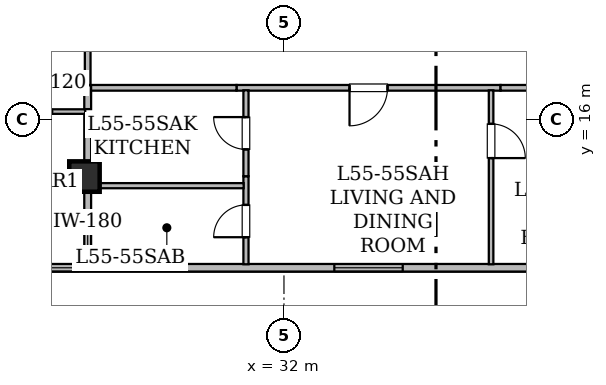
"""IFC4 building model, lengths in metres.
Left out: names, types, materials, properties, quantities, classifications, styles, units other than length and angle.
Written with IfcOpenShell. Run it as: python <this file> out.ifc"""

import sys

from ifc_helpers import new_model, si_unit, direction, frame, frame_2d, origin, origin_2d, place, context, subcontext, project, spatial, rectangle, hollow_rectangle, extrude, element, fill, save


model = new_model("IFC4")
c1 = context("Model", 3, precision=1e-05, world=origin(), true_north=direction((0.0, 1.0)))
c2 = subcontext(c1, "Body", "Model", "MODEL_VIEW")
j1 = project(units=[si_unit("LENGTHUNIT", "METRE"), si_unit("PLANEANGLEUNIT", "RADIAN")], contexts=[c1])
p1 = place(None, origin())
s1 = spatial("IfcSite", under=j1, at=p1, CompositionType="ELEMENT")
p2 = place(p1, origin())
s2 = spatial("IfcBuilding", under=s1, at=p2, CompositionType="ELEMENT")
p3 = place(p2, frame((0.0, 0.0, 217.2)))
s3 = spatial("IfcBuildingStorey", under=s2, at=p3, CompositionType="ELEMENT", Elevation=217.2)
p4 = place(p3, frame((26.75, 14.5, 0.025), z_axis=(0.0, 0.0, 1.0), x_axis=(1.0, 0.0, 0.0)))
e1 = element("IfcColumn", 1, at=p4, inside=s3, PredefinedType="COLUMN", context=c2, shape_type="SweptSolid", body=[
    extrude(hollow_rectangle(XDim=0.8, YDim=0.8, WallThickness=0.04, at=origin_2d()), origin(), (0.0, 0.0, 1.0), 3.625),
])
p5 = place(p3, frame((65.696, 12.1, 0.0), z_axis=(0.0, 0.0, 1.0), x_axis=(-1.0, 0.0, 0.0)))
e2 = element("IfcWall", 2, at=p5, inside=s3, PredefinedType="STANDARD", context=c2, shape_type="SweptSolid", body=[
    extrude(rectangle(XDim=41.393, YDim=0.2, at=frame_2d((20.697, 0.0))), origin(), (0.0, 0.0, 1.0), 3.43),
])
p6 = place(p5, frame((39.085, 0.0, 0.85)))
e3 = element("IfcOpeningElement", 3, at=p6, cuts=e2, PredefinedType="OPENING", context=c2, shape_type="SweptSolid", body=[
    extrude(rectangle(XDim=1.8, YDim=0.92, at=frame_2d((0.9, 0.46))), frame((0.0, 0.11, 0.0), z_axis=(0.0, -1.0, 0.0), x_axis=(1.0, 0.0, 0.0)), (0.0, 0.0, 1.0), 0.22),
])
p7 = place(p5, frame((30.571, 0.0, 0.85)))
e4 = element("IfcOpeningElement", 4, at=p7, cuts=e2, PredefinedType="OPENING", context=c2, shape_type="SweptSolid", body=[
    extrude(rectangle(XDim=1.8, YDim=0.92, at=frame_2d((0.9, 0.46))), frame((0.0, 0.11, 0.0), z_axis=(0.0, -1.0, 0.0), x_axis=(1.0, 0.0, 0.0)), (0.0, 0.0, 1.0), 0.22),
])
p8 = place(p5, frame((25.264, 0.0, 0.85)))
e5 = element("IfcOpeningElement", 5, at=p8, cuts=e2, PredefinedType="OPENING", context=c2, shape_type="SweptSolid", body=[
    extrude(rectangle(XDim=1.8, YDim=0.92, at=frame_2d((0.9, 0.46))), frame((0.0, 0.11, 0.0), z_axis=(0.0, -1.0, 0.0), x_axis=(1.0, 0.0, 0.0)), (0.0, 0.0, 1.0), 0.22),
])
p9 = place(p5, frame((16.538, 0.0, 0.85)))
e6 = element("IfcOpeningElement", 6, at=p9, cuts=e2, PredefinedType="OPENING", context=c2, shape_type="SweptSolid", body=[
    extrude(rectangle(XDim=1.8, YDim=0.92, at=frame_2d((0.9, 0.46))), frame((0.0, 0.11, 0.0), z_axis=(0.0, -1.0, 0.0), x_axis=(1.0, 0.0, 0.0)), (0.0, 0.0, 1.0), 0.22),
])
p10 = place(p5, frame((4.105, 0.0, 0.85)))
e7 = element("IfcOpeningElement", 7, at=p10, cuts=e2, PredefinedType="OPENING", context=c2, shape_type="SweptSolid", body=[
    extrude(rectangle(XDim=1.8, YDim=0.92, at=frame_2d((0.9, 0.46))), frame((0.0, 0.11, 0.0), z_axis=(0.0, -1.0, 0.0), x_axis=(1.0, 0.0, 0.0)), (0.0, 0.0, 1.0), 0.22),
])
p11 = place(p3, frame((26.835, 16.9, 0.0), z_axis=(0.0, 0.0, 1.0), x_axis=(0.0, 1.0, 0.0)))
e8 = element("IfcWall", 8, at=p11, inside=s3, PredefinedType="STANDARD", context=c2, shape_type="SweptSolid", body=[
    extrude(rectangle(XDim=7.708, YDim=0.15, at=frame_2d((3.854, 0.0))), origin(), (0.0, 0.0, 1.0), 2.725),
])
p12 = place(p11, frame((3.333, 0.0, 0.0)))
e9 = element("IfcOpeningElement", 9, at=p12, cuts=e8, PredefinedType="OPENING", context=c2, shape_type="SweptSolid", body=[
    extrude(rectangle(XDim=1.0, YDim=2.15, at=frame_2d((0.5, 1.075))), frame((0.0, 0.085, 0.0), z_axis=(0.0, -1.0, 0.0), x_axis=(1.0, 0.0, 0.0)), (0.0, 0.0, 1.0), 0.17),
])
p13 = place(p3, frame((37.699, 16.835, 0.0), z_axis=(0.0, 0.0, 1.0), x_axis=(-1.0, 0.0, 0.0)))
e10 = element("IfcWall", 10, at=p13, inside=s3, PredefinedType="STANDARD", context=c2, shape_type="SweptSolid", body=[
    extrude(rectangle(XDim=6.948, YDim=0.15, at=frame_2d((3.474, 0.0))), origin(), (0.0, 0.0, 1.0), 3.43),
])
p14 = place(p13, frame((2.974, 0.0, 0.0)))
e11 = element("IfcOpeningElement", 11, at=p14, cuts=e10, PredefinedType="OPENING", context=c2, shape_type="SweptSolid", body=[
    extrude(rectangle(XDim=1.0, YDim=2.15, at=frame_2d((0.5, 1.075))), frame((0.0, 0.085, 0.0), z_axis=(0.0, -1.0, 0.0), x_axis=(1.0, 0.0, 0.0)), (0.0, 0.0, 1.0), 0.17),
])
for number, where, z_axis, x_axis in (
    (12, (30.751, 16.835, 0.0), (0.0, 0.0, 1.0), (-1.0, 0.0, 0.0)),
    (13, (41.55, 16.835, 0.0), (0.0, 0.0, 1.0), (-1.0, 0.0, 0.0)),
):
    element("IfcWall", number, at=place(p3, frame(where, z_axis=z_axis, x_axis=x_axis)), inside=s3, PredefinedType="STANDARD", context=c2, shape_type="SweptSolid", body=[
        extrude(rectangle(XDim=3.851, YDim=0.15, at=frame_2d((1.926, 0.0))), origin(), (0.0, 0.0, 1.0), 2.725),
    ])
p15 = place(p3, frame((26.77, 16.21, 0.0), z_axis=(0.0, 0.0, 1.0), x_axis=(-1.0, 0.0, 0.0)))
e14 = element("IfcWall", 14, at=p15, inside=s3, PredefinedType="PARTITIONING", context=c2, shape_type="SweptSolid", body=[
    extrude(rectangle(XDim=6.378, YDim=0.12, at=frame_2d((3.189, 0.0))), origin(), (0.0, 0.0, 1.0), 2.887),
])
p16 = place(p15, frame((2.739, 0.0, 0.0)))
e15 = element("IfcOpeningElement", 15, at=p16, cuts=e14, PredefinedType="OPENING", context=c2, shape_type="SweptSolid", body=[
    extrude(rectangle(XDim=0.9, YDim=2.1, at=frame_2d((0.45, 1.05))), frame((0.0, 0.07, 0.0), z_axis=(0.0, -1.0, 0.0), x_axis=(1.0, 0.0, 0.0)), (0.0, 0.0, 1.0), 0.14),
])
p17 = place(p3, frame((26.835, 16.9, 0.0), z_axis=(0.0, 0.0, 1.0), x_axis=(0.0, -1.0, 0.0)))
e16 = element("IfcWall", 16, at=p17, inside=s3, PredefinedType="STANDARD", context=c2, shape_type="SweptSolid", body=[
    extrude(rectangle(XDim=0.625, YDim=0.18, at=frame_2d((0.312, 0.0))), origin(), (0.0, 0.0, 1.0), 3.43),
])
p18 = place(p3, frame((26.835, 14.509, 0.0), z_axis=(0.0, 0.0, 1.0), x_axis=(0.0, -1.0, 0.0)))
e17 = element("IfcWall", 17, at=p18, inside=s3, PredefinedType="STANDARD", context=c2, shape_type="SweptSolid", body=[
    extrude(rectangle(XDim=2.317, YDim=0.18, at=frame_2d((1.159, 0.0))), origin(), (0.0, 0.0, 1.0), 2.725),
])
p19 = place(p3, frame((26.835, 16.145, 0.0), z_axis=(0.0, 0.0, 1.0), x_axis=(0.0, -1.0, 0.0)))
e18 = element("IfcWall", 18, at=p19, inside=s3, PredefinedType="STANDARD", context=c2, shape_type="SweptSolid", body=[
    extrude(rectangle(XDim=1.636, YDim=0.18, at=frame_2d((0.818, 0.0))), origin(), (0.0, 0.0, 1.0), 2.725),
])
p20 = place(p3, frame((31.0, 12.192, 0.0), z_axis=(0.0, 0.0, 1.0), x_axis=(0.0, 1.0, 0.0)))
e19 = element("IfcWall", 19, at=p20, inside=s3, PredefinedType="PARTITIONING", context=c2, shape_type="SweptSolid", body=[
    extrude(rectangle(XDim=2.317, YDim=0.135, at=frame_2d((1.159, 0.0))), origin(), (0.0, 0.0, 1.0), 2.887),
])
p21 = place(p20, frame((0.712, 0.0, 0.0)))
e20 = element("IfcOpeningElement", 20, at=p21, cuts=e19, PredefinedType="OPENING", context=c2, shape_type="SweptSolid", body=[
    extrude(rectangle(XDim=0.85, YDim=2.1, at=frame_2d((0.425, 1.05))), frame((0.0, 0.077, 0.0), z_axis=(0.0, -1.0, 0.0), x_axis=(1.0, 0.0, 0.0)), (0.0, 0.0, 1.0), 0.155),
])
p22 = place(p3, frame((31.0, 14.509, 0.0), z_axis=(0.0, 0.0, 1.0), x_axis=(0.0, 1.0, 0.0)))
e21 = element("IfcWall", 21, at=p22, inside=s3, PredefinedType="PARTITIONING", context=c2, shape_type="SweptSolid", body=[
    extrude(rectangle(XDim=2.261, YDim=0.135, at=frame_2d((1.13, 0.0))), origin(), (0.0, 0.0, 1.0), 2.887),
])
p23 = place(p22, frame((0.706, 0.0, 0.0)))
e22 = element("IfcOpeningElement", 22, at=p23, cuts=e21, PredefinedType="OPENING", context=c2, shape_type="SweptSolid", body=[
    extrude(rectangle(XDim=0.85, YDim=2.1, at=frame_2d((0.425, 1.05))), frame((0.0, 0.077, 0.0), z_axis=(0.0, -1.0, 0.0), x_axis=(1.0, 0.0, 0.0)), (0.0, 0.0, 1.0), 0.155),
])
p24 = place(p3, frame((37.45, 16.77, 0.0), z_axis=(0.0, 0.0, 1.0), x_axis=(0.0, -1.0, 0.0)))
e23 = element("IfcWall", 23, at=p24, inside=s3, PredefinedType="PARTITIONING", context=c2, shape_type="SweptSolid", body=[
    extrude(rectangle(XDim=4.578, YDim=0.12, at=frame_2d((2.289, 0.0))), origin(), (0.0, 0.0, 1.0), 2.887),
])
p25 = place(p24, frame((0.884, 0.0, 0.0)))
e24 = element("IfcOpeningElement", 24, at=p25, cuts=e23, PredefinedType="OPENING", context=c2, shape_type="SweptSolid", body=[
    extrude(rectangle(XDim=0.9, YDim=2.1, at=frame_2d((0.45, 1.05))), frame((0.0, 0.07, 0.0), z_axis=(0.0, -1.0, 0.0), x_axis=(1.0, 0.0, 0.0)), (0.0, 0.0, 1.0), 0.14),
])
p26 = place(p3, frame((26.917, 14.26, 0.0), z_axis=(0.0, 0.0, 1.0), x_axis=(1.0, 0.0, 0.0)))
e25 = element("IfcWall", 25, at=p26, inside=s3, PredefinedType="PARTITIONING", context=c2, shape_type="SweptSolid", body=[
    extrude(rectangle(XDim=4.022, YDim=0.135, at=frame_2d((2.011, 0.0))), origin(), (0.0, 0.0, 1.0), 2.887),
])
p27 = place(p6, origin())
e26 = element("IfcWindow", 26, at=p27, inside=s3, PartitioningType="SINGLE_PANEL", PredefinedType="WINDOW", context=c2, shape_type="SweptSolid", body=[
    extrude(rectangle(XDim=1.8, YDim=0.92, at=frame_2d((0.9, 0.46))), frame((0.0, 0.03, 0.0), z_axis=(0.0, -1.0, 0.0), x_axis=(1.0, 0.0, 0.0)), (0.0, 0.0, 1.0), 0.06),
])
fill(e3, e26)
p28 = place(p7, origin())
e27 = element("IfcWindow", 27, at=p28, inside=s3, PartitioningType="SINGLE_PANEL", PredefinedType="WINDOW", context=c2, shape_type="SweptSolid", body=[
    extrude(rectangle(XDim=1.8, YDim=0.92, at=frame_2d((0.9, 0.46))), frame((0.0, 0.03, 0.0), z_axis=(0.0, -1.0, 0.0), x_axis=(1.0, 0.0, 0.0)), (0.0, 0.0, 1.0), 0.06),
])
fill(e4, e27)
p29 = place(p14, origin())
e28 = element("IfcDoor", 28, at=p29, inside=s3, OperationType="SINGLE_SWING_RIGHT", PredefinedType="DOOR", context=c2, shape_type="SweptSolid", body=[
    extrude(rectangle(XDim=1.0, YDim=2.15, at=frame_2d((0.5, 1.075))), frame((0.0, 0.025, 0.0), z_axis=(0.0, -1.0, 0.0), x_axis=(1.0, 0.0, 0.0)), (0.0, 0.0, 1.0), 0.05),
])
fill(e11, e28)
p30 = place(p21, origin())
e29 = element("IfcDoor", 29, at=p30, inside=s3, OperationType="SINGLE_SWING_LEFT", PredefinedType="DOOR", context=c2, shape_type="SweptSolid", body=[
    extrude(rectangle(XDim=0.85, YDim=2.1, at=frame_2d((0.425, 1.05))), frame((0.0, 0.025, 0.0), z_axis=(0.0, -1.0, 0.0), x_axis=(1.0, 0.0, 0.0)), (0.0, 0.0, 1.0), 0.05),
])
fill(e20, e29)
p31 = place(p23, origin())
e30 = element("IfcDoor", 30, at=p31, inside=s3, OperationType="SINGLE_SWING_RIGHT", PredefinedType="DOOR", context=c2, shape_type="SweptSolid", body=[
    extrude(rectangle(XDim=0.85, YDim=2.1, at=frame_2d((0.425, 1.05))), frame((0.0, 0.025, 0.0), z_axis=(0.0, -1.0, 0.0), x_axis=(1.0, 0.0, 0.0)), (0.0, 0.0, 1.0), 0.05),
])
fill(e22, e30)
p32 = place(p25, origin())
e31 = element("IfcDoor", 31, at=p32, inside=s3, OperationType="SINGLE_SWING_RIGHT", PredefinedType="DOOR", context=c2, shape_type="SweptSolid", body=[
    extrude(rectangle(XDim=0.9, YDim=2.1, at=frame_2d((0.45, 1.05))), frame((0.0, 0.025, 0.0), z_axis=(0.0, -1.0, 0.0), x_axis=(1.0, 0.0, 0.0)), (0.0, 0.0, 1.0), 0.05),
])
fill(e24, e31)
save(model, sys.argv[1])
